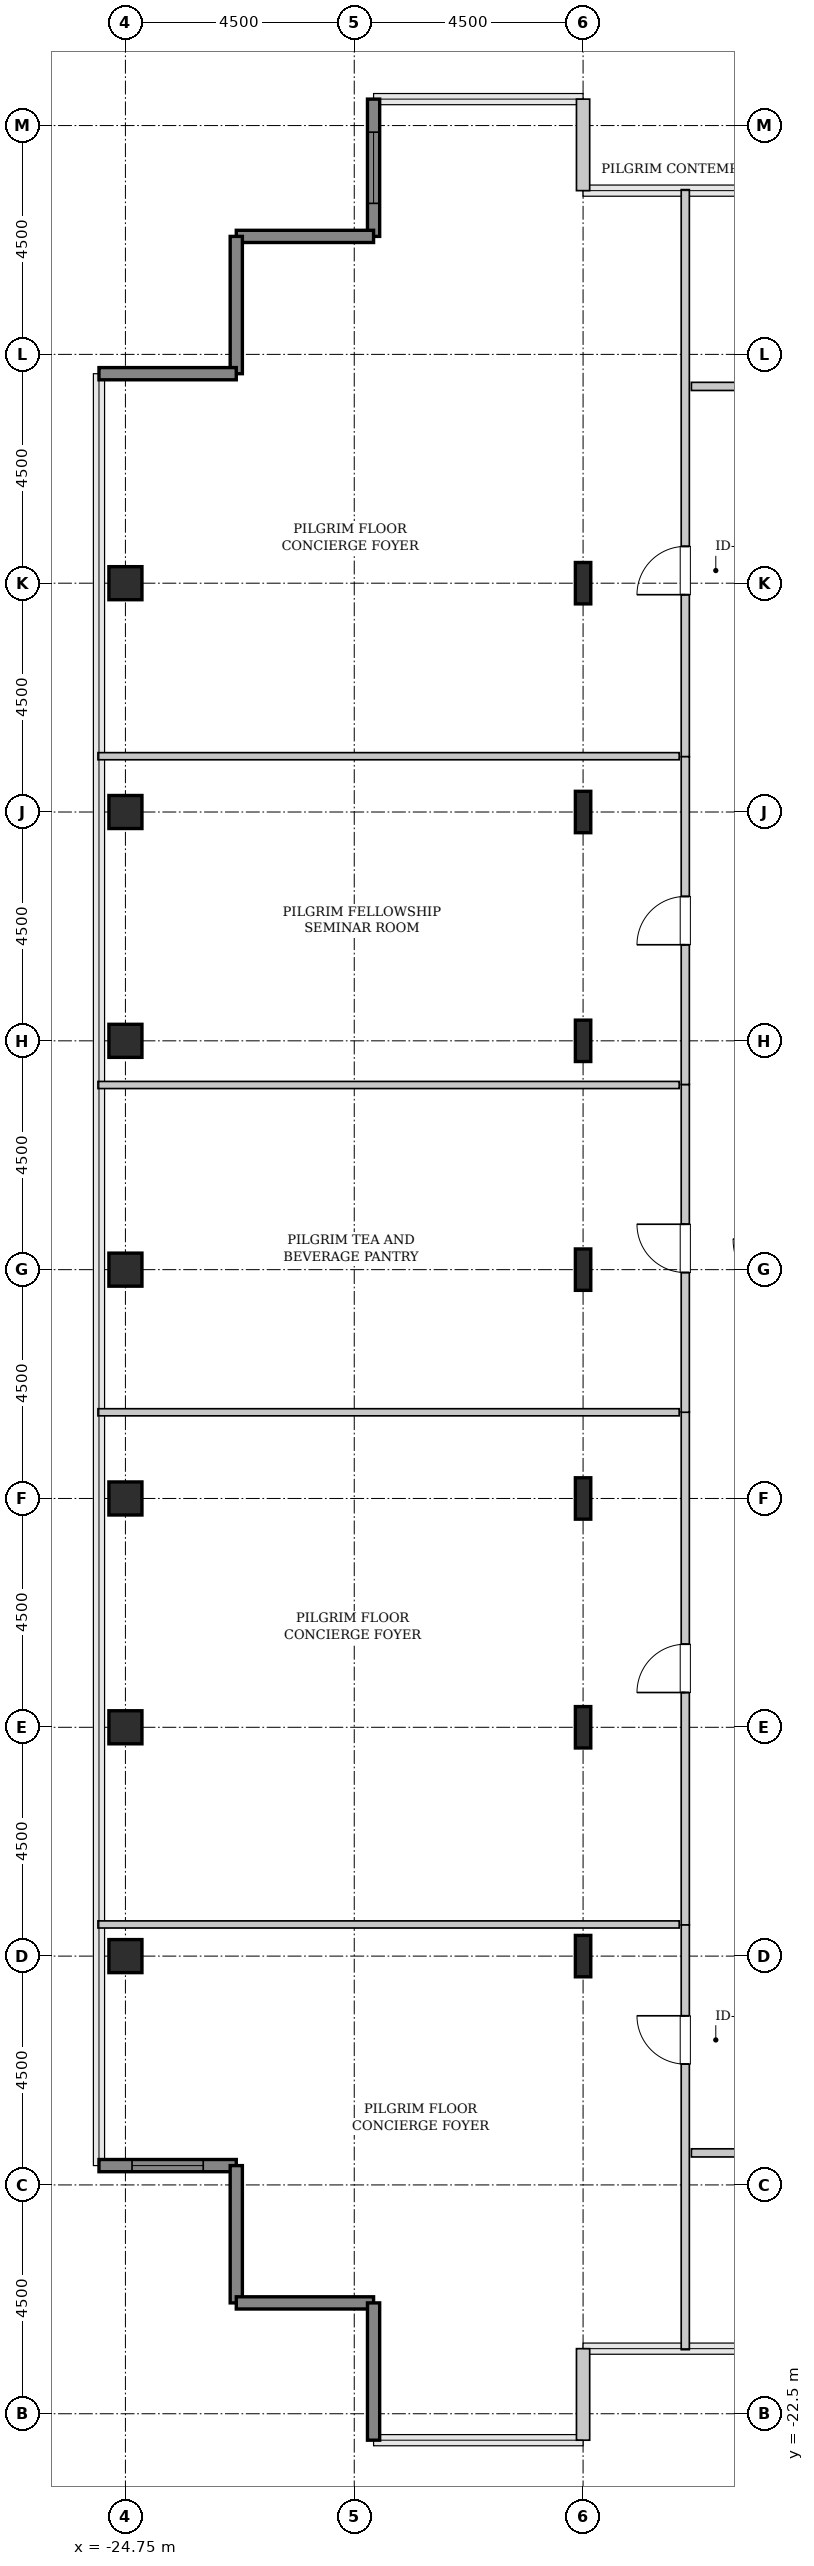
"""IFC4 building model, lengths in metres.
Left out: names, types, materials, properties, quantities, classifications, styles, units other than length and angle.
Written with IfcOpenShell. Run it as: python <this file> out.ifc"""

import sys

from ifc_helpers import new_model, si_unit, direction, frame, frame_2d, origin, origin_2d, place, context, subcontext, project, spatial, rectangle, hollow_rectangle, i_section, extrude, source, transform, mapped, element, fill, save


model = new_model("IFC4")
c1 = context("Model", 3, precision=1e-05, world=origin(), true_north=direction((0.0, 1.0)))
c2 = subcontext(c1, "Body", "Model", "MODEL_VIEW")
j1 = project(units=[si_unit("LENGTHUNIT", "METRE"), si_unit("PLANEANGLEUNIT", "RADIAN")], contexts=[c1])
p1 = place(None, origin())
s1 = spatial("IfcSite", under=j1, at=p1, CompositionType="ELEMENT")
p2 = place(p1, origin())
s2 = spatial("IfcBuilding", under=s1, at=p2, CompositionType="ELEMENT")
p3 = place(p2, frame((0.0, 0.0, 225.6)))
s3 = spatial("IfcBuildingStorey", under=s2, at=p3, CompositionType="ELEMENT", Elevation=225.6)
m1 = source(origin(), c2, "Body", "SweptSolid", [
    extrude(hollow_rectangle(XDim=0.65, YDim=0.65, WallThickness=0.032, InnerFilletRadius=0.032, OuterFilletRadius=0.064, at=origin_2d()), origin(), (0.0, 0.0, 1.0), 3.8),
])
for number, where, z_axis, x_axis in (
    (1, (-24.75, -13.5, 0.0), (0.0, 0.0, 1.0), (1.0, 0.0, 0.0)),
    (2, (-24.75, -9.0, 0.0), (0.0, 0.0, 1.0), (1.0, 0.0, 0.0)),
    (3, (-24.75, -4.5, 0.0), (0.0, 0.0, 1.0), (1.0, 0.0, 0.0)),
    (4, (-24.75, 0.0, 0.0), (0.0, 0.0, 1.0), (1.0, 0.0, 0.0)),
    (5, (-24.75, 4.5, 0.0), (0.0, 0.0, 1.0), (1.0, 0.0, 0.0)),
    (6, (-24.75, 9.0, 0.0), (0.0, 0.0, 1.0), (1.0, 0.0, 0.0)),
    (7, (-24.75, 13.5, 0.0), (0.0, 0.0, 1.0), (1.0, 0.0, 0.0)),
):
    element("IfcColumn", number, at=place(p3, frame(where, z_axis=z_axis, x_axis=x_axis)), inside=s3, PredefinedType="COLUMN", context=c2, shape_type="MappedRepresentation", body=[
        mapped(m1, transform((0.0, 0.0, 0.0), x_axis=(1.0, 0.0, 0.0), y_axis=(0.0, 1.0, 0.0), z_axis=(0.0, 0.0, 1.0), scale=1.0)),
    ])
m2 = source(origin(), c2, "Body", "SweptSolid", [
    extrude(i_section(OverallWidth=0.303, OverallDepth=0.814, WebThickness=0.021, FlangeThickness=0.04, FilletRadius=0.03, at=origin_2d()), origin(), (0.0, 0.0, 1.0), 3.8),
])
for number, where, z_axis, x_axis in (
    (8, (-15.75, -13.5, 0.0), (0.0, 0.0, 1.0), (1.0, 0.0, 0.0)),
    (9, (-15.75, -9.0, 0.0), (0.0, 0.0, 1.0), (1.0, 0.0, 0.0)),
    (10, (-15.75, -4.5, 0.0), (0.0, 0.0, 1.0), (1.0, 0.0, 0.0)),
    (11, (-15.75, 0.0, 0.0), (0.0, 0.0, 1.0), (1.0, 0.0, 0.0)),
    (12, (-15.75, 4.5, 0.0), (0.0, 0.0, 1.0), (1.0, 0.0, 0.0)),
    (13, (-15.75, 9.0, 0.0), (0.0, 0.0, 1.0), (1.0, 0.0, 0.0)),
    (14, (-15.75, 13.5, 0.0), (0.0, 0.0, 1.0), (1.0, 0.0, 0.0)),
):
    element("IfcColumn", number, at=place(p3, frame(where, z_axis=z_axis, x_axis=x_axis)), inside=s3, PredefinedType="COLUMN", context=c2, shape_type="MappedRepresentation", body=[
        mapped(m2, transform((0.0, 0.0, 0.0), x_axis=(1.0, 0.0, 0.0), y_axis=(0.0, 1.0, 0.0), z_axis=(0.0, 0.0, 1.0), scale=1.0)),
    ])
m3 = source(origin(), c2, "Body", "SweptSolid", [
    extrude(rectangle(XDim=1.8, YDim=0.26, at=frame_2d((0.9, 0.0))), origin(), (0.0, 0.0, 1.0), 3.55),
])
p4 = place(p3, frame((-15.75, 21.22, 0.0), z_axis=(0.0, 0.0, 1.0), x_axis=(0.0, 1.0, 0.0)))
e15 = element("IfcWall", 15, at=p4, inside=s3, PredefinedType="SOLIDWALL", context=c2, shape_type="MappedRepresentation", body=[
    mapped(m3, transform((0.0, 0.0, 0.0), x_axis=(1.0, 0.0, 0.0), y_axis=(0.0, 1.0, 0.0), z_axis=(0.0, 0.0, 1.0), scale=1.0)),
])
m4 = source(origin(), c2, "Body", "SweptSolid", [
    extrude(rectangle(XDim=2.7, YDim=0.24, at=frame_2d((1.35, 0.0))), origin(), (0.0, 0.0, 1.0), 3.55),
])
p5 = place(p3, frame((-19.87, 23.02, 0.0), z_axis=(0.0, 0.0, 1.0), x_axis=(0.0, -1.0, 0.0)))
e16 = element("IfcWall", 16, at=p5, inside=s3, PredefinedType="SHEAR", context=c2, shape_type="MappedRepresentation", body=[
    mapped(m4, transform((0.0, 0.0, 0.0), x_axis=(1.0, 0.0, 0.0), y_axis=(0.0, 1.0, 0.0), z_axis=(0.0, 0.0, 1.0), scale=1.0)),
])
p6 = place(p5, frame((0.65, 0.0, 0.85)))
e17 = element("IfcOpeningElement", 17, at=p6, cuts=e16, PredefinedType="OPENING", context=c2, shape_type="SweptSolid", body=[
    extrude(rectangle(XDim=1.4, YDim=1.8, at=frame_2d((0.7, 0.9))), frame((0.0, 0.13, 0.0), z_axis=(0.0, -1.0, 0.0), x_axis=(1.0, 0.0, 0.0)), (0.0, 0.0, 1.0), 0.26),
])
for number, where, z_axis, x_axis in (
    (18, (-19.87, 20.32, 0.0), (0.0, 0.0, 1.0), (-1.0, 0.0, 0.0)),
    (19, (-22.57, 20.32, 0.0), (0.0, 0.0, 1.0), (0.0, -1.0, 0.0)),
    (20, (-22.57, 17.62, 0.0), (0.0, 0.0, 1.0), (-1.0, 0.0, 0.0)),
):
    element("IfcWall", number, at=place(p3, frame(where, z_axis=z_axis, x_axis=x_axis)), inside=s3, PredefinedType="SHEAR", context=c2, shape_type="MappedRepresentation", body=[
        mapped(m4, transform((0.0, 0.0, 0.0), x_axis=(1.0, 0.0, 0.0), y_axis=(0.0, 1.0, 0.0), z_axis=(0.0, 0.0, 1.0), scale=1.0)),
    ])
p7 = place(p3, frame((-25.27, -17.62, 0.0), z_axis=(0.0, 0.0, 1.0), x_axis=(1.0, 0.0, 0.0)))
e21 = element("IfcWall", 21, at=p7, inside=s3, PredefinedType="SHEAR", context=c2, shape_type="MappedRepresentation", body=[
    mapped(m4, transform((0.0, 0.0, 0.0), x_axis=(1.0, 0.0, 0.0), y_axis=(0.0, 1.0, 0.0), z_axis=(0.0, 0.0, 1.0), scale=1.0)),
])
p8 = place(p7, frame((0.65, 0.0, 0.85)))
e22 = element("IfcOpeningElement", 22, at=p8, cuts=e21, PredefinedType="OPENING", context=c2, shape_type="SweptSolid", body=[
    extrude(rectangle(XDim=1.4, YDim=1.8, at=frame_2d((0.7, 0.9))), frame((0.0, 0.13, 0.0), z_axis=(0.0, -1.0, 0.0), x_axis=(1.0, 0.0, 0.0)), (0.0, 0.0, 1.0), 0.26),
])
for number, where, z_axis, x_axis in (
    (23, (-22.57, -17.62, 0.0), (0.0, 0.0, 1.0), (0.0, -1.0, 0.0)),
    (24, (-22.57, -20.32, 0.0), (0.0, 0.0, 1.0), (1.0, 0.0, 0.0)),
    (25, (-19.87, -20.32, 0.0), (0.0, 0.0, 1.0), (0.0, -1.0, 0.0)),
):
    element("IfcWall", number, at=place(p3, frame(where, z_axis=z_axis, x_axis=x_axis)), inside=s3, PredefinedType="SHEAR", context=c2, shape_type="MappedRepresentation", body=[
        mapped(m4, transform((0.0, 0.0, 0.0), x_axis=(1.0, 0.0, 0.0), y_axis=(0.0, 1.0, 0.0), z_axis=(0.0, 0.0, 1.0), scale=1.0)),
    ])
p9 = place(p3, frame((-15.75, -23.02, 0.0), z_axis=(0.0, 0.0, 1.0), x_axis=(0.0, 1.0, 0.0)))
e26 = element("IfcWall", 26, at=p9, inside=s3, PredefinedType="SOLIDWALL", context=c2, shape_type="MappedRepresentation", body=[
    mapped(m3, transform((0.0, 0.0, 0.0), x_axis=(1.0, 0.0, 0.0), y_axis=(0.0, 1.0, 0.0), z_axis=(0.0, 0.0, 1.0), scale=1.0)),
])
m5 = source(origin(), c2, "Body", "SweptSolid", [
    extrude(rectangle(XDim=10.093, YDim=0.16, at=frame_2d((5.046, 0.0))), origin(), (0.0, 0.0, 1.0), 3.535),
])
p10 = place(p3, frame((-13.74, -12.887, 0.0), z_axis=(0.0, 0.0, 1.0), x_axis=(0.0, 1.0, 0.0)))
e27 = element("IfcWall", 27, at=p10, inside=s3, PredefinedType="PARTITIONING", context=c2, shape_type="MappedRepresentation", body=[
    mapped(m5, transform((0.0, 0.0, 0.0), x_axis=(1.0, 0.0, 0.0), y_axis=(0.0, 1.0, 0.0), z_axis=(0.0, 0.0, 1.0), scale=1.0)),
])
p11 = place(p10, frame((4.571, 0.0, 0.0)))
e28 = element("IfcOpeningElement", 28, at=p11, cuts=e27, PredefinedType="OPENING", context=c2, shape_type="SweptSolid", body=[
    extrude(rectangle(XDim=0.95, YDim=2.1, at=frame_2d((0.475, 1.05))), frame((0.0, 0.09, 0.0), z_axis=(0.0, -1.0, 0.0), x_axis=(1.0, 0.0, 0.0)), (0.0, 0.0, 1.0), 0.18),
])
m6 = source(origin(), c2, "Body", "SweptSolid", [
    extrude(rectangle(XDim=11.43, YDim=0.14, at=frame_2d((5.715, 0.0))), origin(), (0.0, 0.0, 1.0), 3.535),
])
for number, where, z_axis, x_axis in (
    (29, (-25.29, -12.877, 0.0), (0.0, 0.0, 1.0), (1.0, 0.0, 0.0)),
    (30, (-25.29, -2.805, 0.0), (0.0, 0.0, 1.0), (1.0, 0.0, 0.0)),
):
    element("IfcWall", number, at=place(p3, frame(where, z_axis=z_axis, x_axis=x_axis)), inside=s3, PredefinedType="PARTITIONING", context=c2, shape_type="MappedRepresentation", body=[
        mapped(m6, transform((0.0, 0.0, 0.0), x_axis=(1.0, 0.0, 0.0), y_axis=(0.0, 1.0, 0.0), z_axis=(0.0, 0.0, 1.0), scale=1.0)),
    ])
m7 = source(origin(), c2, "Body", "SweptSolid", [
    extrude(rectangle(XDim=8.353, YDim=0.16, at=frame_2d((4.176, 0.0))), origin(), (0.0, 0.0, 1.0), 3.535),
])
p12 = place(p3, frame((-13.74, -21.24, 0.0), z_axis=(0.0, 0.0, 1.0), x_axis=(0.0, 1.0, 0.0)))
e31 = element("IfcWall", 31, at=p12, inside=s3, PredefinedType="PARTITIONING", context=c2, shape_type="MappedRepresentation", body=[
    mapped(m7, transform((0.0, 0.0, 0.0), x_axis=(1.0, 0.0, 0.0), y_axis=(0.0, 1.0, 0.0), z_axis=(0.0, 0.0, 1.0), scale=1.0)),
])
p13 = place(p12, frame((5.616, 0.0, 0.0)))
e32 = element("IfcOpeningElement", 32, at=p13, cuts=e31, PredefinedType="OPENING", context=c2, shape_type="SweptSolid", body=[
    extrude(rectangle(XDim=0.95, YDim=2.1, at=frame_2d((0.475, 1.05))), frame((0.0, 0.09, 0.0), z_axis=(0.0, -1.0, 0.0), x_axis=(1.0, 0.0, 0.0)), (0.0, 0.0, 1.0), 0.18),
])
m8 = source(origin(), c2, "Body", "SweptSolid", [
    extrude(rectangle(XDim=11.153, YDim=0.16, at=frame_2d((5.576, 0.0))), origin(), (0.0, 0.0, 1.0), 3.535),
])
p14 = place(p3, frame((-13.74, 10.087, 0.0), z_axis=(0.0, 0.0, 1.0), x_axis=(0.0, 1.0, 0.0)))
e33 = element("IfcWall", 33, at=p14, inside=s3, PredefinedType="PARTITIONING", context=c2, shape_type="MappedRepresentation", body=[
    mapped(m8, transform((0.0, 0.0, 0.0), x_axis=(1.0, 0.0, 0.0), y_axis=(0.0, 1.0, 0.0), z_axis=(0.0, 0.0, 1.0), scale=1.0)),
])
p15 = place(p14, frame((3.186, 0.0, 0.0)))
e34 = element("IfcOpeningElement", 34, at=p15, cuts=e33, PredefinedType="OPENING", context=c2, shape_type="SweptSolid", body=[
    extrude(rectangle(XDim=0.95, YDim=2.1, at=frame_2d((0.475, 1.05))), frame((0.0, 0.09, 0.0), z_axis=(0.0, -1.0, 0.0), x_axis=(1.0, 0.0, 0.0)), (0.0, 0.0, 1.0), 0.18),
])
p16 = place(p3, frame((-25.29, 10.097, 0.0), z_axis=(0.0, 0.0, 1.0), x_axis=(1.0, 0.0, 0.0)))
e35 = element("IfcWall", 35, at=p16, inside=s3, PredefinedType="PARTITIONING", context=c2, shape_type="MappedRepresentation", body=[
    mapped(m6, transform((0.0, 0.0, 0.0), x_axis=(1.0, 0.0, 0.0), y_axis=(0.0, 1.0, 0.0), z_axis=(0.0, 0.0, 1.0), scale=1.0)),
])
m9 = source(origin(), c2, "Body", "SweptSolid", [
    extrude(rectangle(XDim=6.446, YDim=0.16, at=frame_2d((3.223, 0.0))), origin(), (0.0, 0.0, 1.0), 3.535),
])
p17 = place(p3, frame((-13.74, -2.805, 0.0), z_axis=(0.0, 0.0, 1.0), x_axis=(0.0, 1.0, 0.0)))
e36 = element("IfcWall", 36, at=p17, inside=s3, PredefinedType="PARTITIONING", context=c2, shape_type="MappedRepresentation", body=[
    mapped(m9, transform((0.0, 0.0, 0.0), x_axis=(1.0, 0.0, 0.0), y_axis=(0.0, 1.0, 0.0), z_axis=(0.0, 0.0, 1.0), scale=1.0)),
])
p18 = place(p17, frame((2.748, 0.0, 0.0)))
e37 = element("IfcOpeningElement", 37, at=p18, cuts=e36, PredefinedType="OPENING", context=c2, shape_type="SweptSolid", body=[
    extrude(rectangle(XDim=0.95, YDim=2.1, at=frame_2d((0.475, 1.05))), frame((0.0, 0.09, 0.0), z_axis=(0.0, -1.0, 0.0), x_axis=(1.0, 0.0, 0.0)), (0.0, 0.0, 1.0), 0.18),
])
p19 = place(p3, frame((-25.29, 3.631, 0.0), z_axis=(0.0, 0.0, 1.0), x_axis=(1.0, 0.0, 0.0)))
e38 = element("IfcWall", 38, at=p19, inside=s3, PredefinedType="PARTITIONING", context=c2, shape_type="MappedRepresentation", body=[
    mapped(m6, transform((0.0, 0.0, 0.0), x_axis=(1.0, 0.0, 0.0), y_axis=(0.0, 1.0, 0.0), z_axis=(0.0, 0.0, 1.0), scale=1.0)),
])
m10 = source(origin(), c2, "Body", "SweptSolid", [
    extrude(rectangle(XDim=6.446, YDim=0.16, at=frame_2d((3.223, 0.0))), origin(), (0.0, 0.0, 1.0), 3.535),
])
p20 = place(p3, frame((-13.74, 3.641, 0.0), z_axis=(0.0, 0.0, 1.0), x_axis=(0.0, 1.0, 0.0)))
e39 = element("IfcWall", 39, at=p20, inside=s3, PredefinedType="PARTITIONING", context=c2, shape_type="MappedRepresentation", body=[
    mapped(m10, transform((0.0, 0.0, 0.0), x_axis=(1.0, 0.0, 0.0), y_axis=(0.0, 1.0, 0.0), z_axis=(0.0, 0.0, 1.0), scale=1.0)),
])
p21 = place(p20, frame((2.748, 0.0, 0.0)))
e40 = element("IfcOpeningElement", 40, at=p21, cuts=e39, PredefinedType="OPENING", context=c2, shape_type="SweptSolid", body=[
    extrude(rectangle(XDim=0.95, YDim=2.1, at=frame_2d((0.475, 1.05))), frame((0.0, 0.09, 0.0), z_axis=(0.0, -1.0, 0.0), x_axis=(1.0, 0.0, 0.0)), (0.0, 0.0, 1.0), 0.18),
])
m11 = source(origin(), c2, "Body", "SweptSolid", [
    extrude(rectangle(XDim=4.16, YDim=0.16, at=frame_2d((2.08, 0.0))), origin(), (0.0, 0.0, 1.0), 3.535),
])
p22 = place(p3, frame((-13.62, 17.37, 0.0), z_axis=(0.0, 0.0, 1.0), x_axis=(1.0, 0.0, 0.0)))
e41 = element("IfcWall", 41, at=p22, inside=s3, PredefinedType="PARTITIONING", context=c2, shape_type="MappedRepresentation", body=[
    mapped(m11, transform((0.0, 0.0, 0.0), x_axis=(1.0, 0.0, 0.0), y_axis=(0.0, 1.0, 0.0), z_axis=(0.0, 0.0, 1.0), scale=1.0)),
])
p23 = place(p22, frame((0.969, 0.0, 0.0)))
e42 = element("IfcOpeningElement", 42, at=p23, cuts=e41, PredefinedType="OPENING", context=c2, shape_type="SweptSolid", body=[
    extrude(rectangle(XDim=0.95, YDim=2.1, at=frame_2d((0.475, 1.05))), frame((0.0, 0.09, 0.0), z_axis=(0.0, -1.0, 0.0), x_axis=(1.0, 0.0, 0.0)), (0.0, 0.0, 1.0), 0.18),
])
m12 = source(origin(), c2, "Body", "SweptSolid", [
    extrude(rectangle(XDim=8.86, YDim=0.16, at=frame_2d((4.43, 0.0))), origin(), (0.0, 0.0, 1.0), 3.535),
])
p24 = place(p3, frame((-13.62, -17.37, 0.0), z_axis=(0.0, 0.0, 1.0), x_axis=(1.0, 0.0, 0.0)))
e43 = element("IfcWall", 43, at=p24, inside=s3, PredefinedType="PARTITIONING", context=c2, shape_type="MappedRepresentation", body=[
    mapped(m12, transform((0.0, 0.0, 0.0), x_axis=(1.0, 0.0, 0.0), y_axis=(0.0, 1.0, 0.0), z_axis=(0.0, 0.0, 1.0), scale=1.0)),
])
p25 = place(p24, frame((3.955, 0.0, 0.0)))
e44 = element("IfcOpeningElement", 44, at=p25, cuts=e43, PredefinedType="OPENING", context=c2, shape_type="SweptSolid", body=[
    extrude(rectangle(XDim=0.95, YDim=2.1, at=frame_2d((0.475, 1.05))), frame((0.0, 0.09, 0.0), z_axis=(0.0, -1.0, 0.0), x_axis=(1.0, 0.0, 0.0)), (0.0, 0.0, 1.0), 0.18),
])
m13 = source(origin(), c2, "Body", "SweptSolid", [
    extrude(rectangle(XDim=1.4, YDim=1.8, at=frame_2d((0.7, 0.9))), frame((0.0, 0.03, 0.0), z_axis=(0.0, -1.0, 0.0), x_axis=(1.0, 0.0, 0.0)), (0.0, 0.0, 1.0), 0.06),
])
p26 = place(p6, origin())
e45 = element("IfcWindow", 45, at=p26, inside=s3, PartitioningType="SINGLE_PANEL", PredefinedType="WINDOW", context=c2, shape_type="MappedRepresentation", body=[
    mapped(m13, transform((0.0, 0.0, 0.0), x_axis=(1.0, 0.0, 0.0), y_axis=(0.0, 1.0, 0.0), z_axis=(0.0, 0.0, 1.0), scale=1.0)),
])
fill(e17, e45)
p27 = place(p8, origin())
e46 = element("IfcWindow", 46, at=p27, inside=s3, PartitioningType="SINGLE_PANEL", PredefinedType="WINDOW", context=c2, shape_type="MappedRepresentation", body=[
    mapped(m13, transform((0.0, 0.0, 0.0), x_axis=(1.0, 0.0, 0.0), y_axis=(0.0, 1.0, 0.0), z_axis=(0.0, 0.0, 1.0), scale=1.0)),
])
fill(e22, e46)
m14 = source(origin(), c2, "Body", "SweptSolid", [
    extrude(rectangle(XDim=0.95, YDim=2.1, at=frame_2d((0.475, 1.05))), frame((0.0, 0.025, 0.0), z_axis=(0.0, -1.0, 0.0), x_axis=(1.0, 0.0, 0.0)), (0.0, 0.0, 1.0), 0.05),
])
p28 = place(p11, origin())
e47 = element("IfcDoor", 47, at=p28, inside=s3, OperationType="SINGLE_SWING_LEFT", PredefinedType="DOOR", context=c2, shape_type="MappedRepresentation", body=[
    mapped(m14, transform((0.0, 0.0, 0.0), x_axis=(1.0, 0.0, 0.0), y_axis=(0.0, 1.0, 0.0), z_axis=(0.0, 0.0, 1.0), scale=1.0)),
])
fill(e28, e47)
p29 = place(p13, origin())
e48 = element("IfcDoor", 48, at=p29, inside=s3, OperationType="SINGLE_SWING_RIGHT", PredefinedType="DOOR", context=c2, shape_type="MappedRepresentation", body=[
    mapped(m14, transform((0.0, 0.0, 0.0), x_axis=(1.0, 0.0, 0.0), y_axis=(0.0, 1.0, 0.0), z_axis=(0.0, 0.0, 1.0), scale=1.0)),
])
fill(e32, e48)
p30 = place(p15, origin())
e49 = element("IfcDoor", 49, at=p30, inside=s3, OperationType="SINGLE_SWING_LEFT", PredefinedType="DOOR", context=c2, shape_type="MappedRepresentation", body=[
    mapped(m14, transform((0.0, 0.0, 0.0), x_axis=(1.0, 0.0, 0.0), y_axis=(0.0, 1.0, 0.0), z_axis=(0.0, 0.0, 1.0), scale=1.0)),
])
fill(e34, e49)
p31 = place(p18, origin())
e50 = element("IfcDoor", 50, at=p31, inside=s3, OperationType="SINGLE_SWING_RIGHT", PredefinedType="DOOR", context=c2, shape_type="MappedRepresentation", body=[
    mapped(m14, transform((0.0, 0.0, 0.0), x_axis=(1.0, 0.0, 0.0), y_axis=(0.0, 1.0, 0.0), z_axis=(0.0, 0.0, 1.0), scale=1.0)),
])
fill(e37, e50)
p32 = place(p21, origin())
e51 = element("IfcDoor", 51, at=p32, inside=s3, OperationType="SINGLE_SWING_LEFT", PredefinedType="DOOR", context=c2, shape_type="MappedRepresentation", body=[
    mapped(m14, transform((0.0, 0.0, 0.0), x_axis=(1.0, 0.0, 0.0), y_axis=(0.0, 1.0, 0.0), z_axis=(0.0, 0.0, 1.0), scale=1.0)),
])
fill(e40, e51)
save(model, sys.argv[1])
